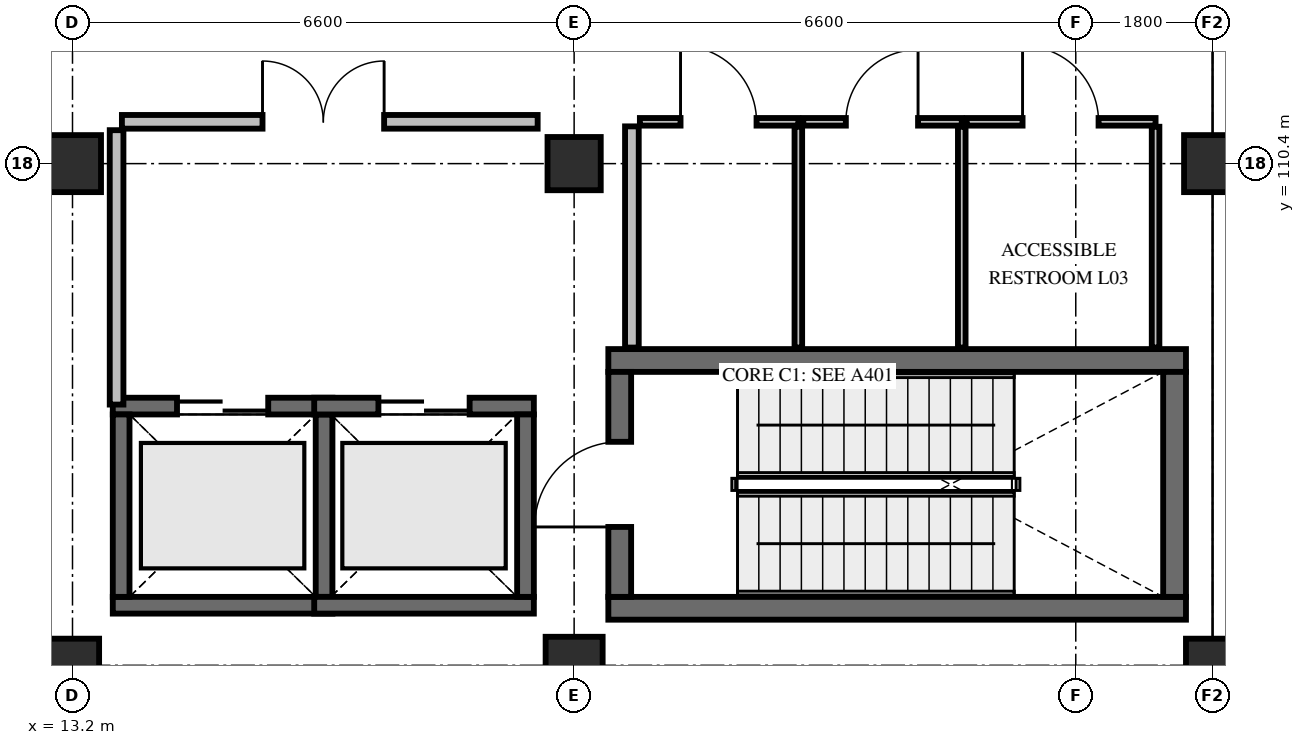
"""IFC4 building model, lengths in metres.
Left out: names, types, materials, properties, quantities, classifications, styles, units other than length and angle.
Written with IfcOpenShell. Run it as: python <this file> out.ifc"""

import sys

from ifc_helpers import new_model, si_unit, direction, frame, frame_2d, origin, origin_2d, place, context, subcontext, project, spatial, rectangle, extrude, element, fill, save


model = new_model("IFC4")
c1 = context("Model", 3, precision=1e-05, world=origin(), true_north=direction((0.0, 1.0)))
c2 = subcontext(c1, "Body", "Model", "MODEL_VIEW")
j1 = project(units=[si_unit("LENGTHUNIT", "METRE"), si_unit("PLANEANGLEUNIT", "RADIAN")], contexts=[c1])
p1 = place(None, origin())
s1 = spatial("IfcSite", under=j1, at=p1, CompositionType="ELEMENT")
p2 = place(p1, origin())
s2 = spatial("IfcBuilding", under=s1, at=p2, CompositionType="ELEMENT")
p3 = place(p2, frame((0.0, 0.0, 15.0)))
s3 = spatial("IfcBuildingStorey", under=s2, at=p3, CompositionType="ELEMENT", Elevation=15.0)
p4 = place(p3, frame((13.2, 103.8, 0.0), z_axis=(0.0, 0.0, 1.0), x_axis=(1.0, 0.0, 0.0)))
e1 = element("IfcColumn", 1, at=p4, inside=s3, PredefinedType="COLUMN", context=c2, shape_type="SweptSolid", body=[
    extrude(rectangle(XDim=0.7, YDim=0.7, at=origin_2d()), origin(), (0.0, 0.0, 1.0), 4.8),
])
for number, where, z_axis, x_axis in (
    (2, (13.2, 110.4, 0.0), (0.0, 0.0, 1.0), (1.0, 0.0, 0.0)),
    (3, (19.8, 103.8, 0.0), (0.0, 0.0, 1.0), (1.0, 0.0, 0.0)),
):
    element("IfcColumn", number, at=place(p3, frame(where, z_axis=z_axis, x_axis=x_axis)), inside=s3, PredefinedType="COLUMN", context=c2, shape_type="SweptSolid", body=[
        extrude(rectangle(XDim=0.75, YDim=0.75, at=origin_2d()), origin(), (0.0, 0.0, 1.0), 4.8),
    ])
for number, where, z_axis, x_axis in (
    (4, (19.8, 110.4, 0.0), (0.0, 0.0, 1.0), (1.0, 0.0, 0.0)),
    (5, (28.2, 103.8, 0.0), (0.0, 0.0, 1.0), (1.0, 0.0, 0.0)),
):
    element("IfcColumn", number, at=place(p3, frame(where, z_axis=z_axis, x_axis=x_axis)), inside=s3, PredefinedType="COLUMN", context=c2, shape_type="SweptSolid", body=[
        extrude(rectangle(XDim=0.7, YDim=0.7, at=origin_2d()), origin(), (0.0, 0.0, 1.0), 4.8),
    ])
p5 = place(p3, frame((28.2, 110.4, 0.0), z_axis=(0.0, 0.0, 1.0), x_axis=(1.0, 0.0, 0.0)))
e6 = element("IfcColumn", 6, at=p5, inside=s3, PredefinedType="COLUMN", context=c2, shape_type="SweptSolid", body=[
    extrude(rectangle(XDim=0.75, YDim=0.75, at=origin_2d()), origin(), (0.0, 0.0, 1.0), 4.8),
])
for number, where, z_axis, x_axis in (
    (7, (20.25, 104.55, 0.0), (0.0, 0.0, 1.0), (1.0, 0.0, 0.0)),
    (8, (20.25, 107.81, 0.0), (0.0, 0.0, 1.0), (1.0, 0.0, 0.0)),
):
    element("IfcWall", number, at=place(p3, frame(where, z_axis=z_axis, x_axis=x_axis)), inside=s3, PredefinedType="SHEAR", context=c2, shape_type="SweptSolid", body=[
        extrude(rectangle(XDim=7.6, YDim=0.3, at=frame_2d((3.8, 0.0))), origin(), (0.0, 0.0, 1.0), 4.5),
    ])
p6 = place(p3, frame((20.4, 104.7, 0.0), z_axis=(0.0, 0.0, 1.0), x_axis=(0.0, 1.0, 0.0)))
e9 = element("IfcWall", 9, at=p6, inside=s3, PredefinedType="SHEAR", context=c2, shape_type="SweptSolid", body=[
    extrude(rectangle(XDim=2.96, YDim=0.3, at=frame_2d((1.48, 0.0))), origin(), (0.0, 0.0, 1.0), 4.5),
])
p7 = place(p6, frame((0.92, 0.0, 0.0)))
e10 = element("IfcOpeningElement", 10, at=p7, cuts=e9, PredefinedType="OPENING", context=c2, shape_type="SweptSolid", body=[
    extrude(rectangle(XDim=1.12, YDim=2.2, at=frame_2d((0.56, 1.1))), frame((0.0, 0.165, 0.0), z_axis=(0.0, -1.0, 0.0), x_axis=(1.0, 0.0, 0.0)), (0.0, 0.0, 1.0), 0.33),
])
p8 = place(p3, frame((27.7, 104.7, 0.0), z_axis=(0.0, 0.0, 1.0), x_axis=(0.0, 1.0, 0.0)))
e11 = element("IfcWall", 11, at=p8, inside=s3, PredefinedType="SHEAR", context=c2, shape_type="SweptSolid", body=[
    extrude(rectangle(XDim=2.96, YDim=0.3, at=frame_2d((1.48, 0.0))), origin(), (0.0, 0.0, 1.0), 4.5),
])
p9 = place(p3, frame((13.73, 104.59, 0.0), z_axis=(0.0, 0.0, 1.0), x_axis=(1.0, 0.0, 0.0)))
e12 = element("IfcWall", 12, at=p9, inside=s3, PredefinedType="SHEAR", context=c2, shape_type="SweptSolid", body=[
    extrude(rectangle(XDim=2.89, YDim=0.22, at=frame_2d((1.445, 0.0))), origin(), (0.0, 0.0, 1.0), 4.5),
])
p10 = place(p3, frame((13.73, 107.21, 0.0), z_axis=(0.0, 0.0, 1.0), x_axis=(1.0, 0.0, 0.0)))
e13 = element("IfcWall", 13, at=p10, inside=s3, PredefinedType="SHEAR", context=c2, shape_type="SweptSolid", body=[
    extrude(rectangle(XDim=2.89, YDim=0.22, at=frame_2d((1.445, 0.0))), origin(), (0.0, 0.0, 1.0), 4.5),
])
p11 = place(p10, frame((0.845, 0.0, 0.0)))
e14 = element("IfcOpeningElement", 14, at=p11, cuts=e13, PredefinedType="OPENING", context=c2, shape_type="SweptSolid", body=[
    extrude(rectangle(XDim=1.2, YDim=2.2, at=frame_2d((0.6, 1.1))), frame((0.0, 0.125, 0.0), z_axis=(0.0, -1.0, 0.0), x_axis=(1.0, 0.0, 0.0)), (0.0, 0.0, 1.0), 0.25),
])
for number, where, z_axis, x_axis in (
    (15, (13.84, 104.7, 0.0), (0.0, 0.0, 1.0), (0.0, 1.0, 0.0)),
    (16, (16.51, 104.7, 0.0), (0.0, 0.0, 1.0), (0.0, 1.0, 0.0)),
):
    element("IfcWall", number, at=place(p3, frame(where, z_axis=z_axis, x_axis=x_axis)), inside=s3, PredefinedType="SHEAR", context=c2, shape_type="SweptSolid", body=[
        extrude(rectangle(XDim=2.4, YDim=0.22, at=frame_2d((1.2, 0.0))), origin(), (0.0, 0.0, 1.0), 4.5),
    ])
p12 = place(p3, frame((16.38, 104.59, 0.0), z_axis=(0.0, 0.0, 1.0), x_axis=(1.0, 0.0, 0.0)))
e17 = element("IfcWall", 17, at=p12, inside=s3, PredefinedType="SHEAR", context=c2, shape_type="SweptSolid", body=[
    extrude(rectangle(XDim=2.89, YDim=0.22, at=frame_2d((1.445, 0.0))), origin(), (0.0, 0.0, 1.0), 4.5),
])
p13 = place(p3, frame((16.38, 107.21, 0.0), z_axis=(0.0, 0.0, 1.0), x_axis=(1.0, 0.0, 0.0)))
e18 = element("IfcWall", 18, at=p13, inside=s3, PredefinedType="SHEAR", context=c2, shape_type="SweptSolid", body=[
    extrude(rectangle(XDim=2.89, YDim=0.22, at=frame_2d((1.445, 0.0))), origin(), (0.0, 0.0, 1.0), 4.5),
])
p14 = place(p13, frame((0.845, 0.0, 0.0)))
e19 = element("IfcOpeningElement", 19, at=p14, cuts=e18, PredefinedType="OPENING", context=c2, shape_type="SweptSolid", body=[
    extrude(rectangle(XDim=1.2, YDim=2.2, at=frame_2d((0.6, 1.1))), frame((0.0, 0.125, 0.0), z_axis=(0.0, -1.0, 0.0), x_axis=(1.0, 0.0, 0.0)), (0.0, 0.0, 1.0), 0.25),
])
p15 = place(p3, frame((19.16, 104.7, 0.0), z_axis=(0.0, 0.0, 1.0), x_axis=(0.0, 1.0, 0.0)))
e20 = element("IfcWall", 20, at=p15, inside=s3, PredefinedType="SHEAR", context=c2, shape_type="SweptSolid", body=[
    extrude(rectangle(XDim=2.4, YDim=0.22, at=frame_2d((1.2, 0.0))), origin(), (0.0, 0.0, 1.0), 4.5),
])
p16 = place(p3, frame((13.85, 110.95, 0.0), z_axis=(0.0, 0.0, 1.0), x_axis=(1.0, 0.0, 0.0)))
e21 = element("IfcWall", 21, at=p16, inside=s3, PredefinedType="PARTITIONING", context=c2, shape_type="SweptSolid", body=[
    extrude(rectangle(XDim=5.47, YDim=0.18, at=frame_2d((2.735, 0.0))), origin(), (0.0, 0.0, 1.0), 4.295),
])
p17 = place(p16, frame((1.85, 0.0, 0.0)))
e22 = element("IfcOpeningElement", 22, at=p17, cuts=e21, PredefinedType="OPENING", context=c2, shape_type="SweptSolid", body=[
    extrude(rectangle(XDim=1.6, YDim=2.25, at=frame_2d((0.8, 1.125))), frame((0.0, 0.105, 0.0), z_axis=(0.0, -1.0, 0.0), x_axis=(1.0, 0.0, 0.0)), (0.0, 0.0, 1.0), 0.21),
])
p18 = place(p3, frame((13.78, 107.23, 0.0), z_axis=(0.0, 0.0, 1.0), x_axis=(0.0, 1.0, 0.0)))
e23 = element("IfcWall", 23, at=p18, inside=s3, PredefinedType="PARTITIONING", context=c2, shape_type="SweptSolid", body=[
    extrude(rectangle(XDim=3.61, YDim=0.18, at=frame_2d((1.805, 0.0))), origin(), (0.0, 0.0, 1.0), 4.18),
])
p19 = place(p3, frame((20.56, 107.98, 0.0), z_axis=(0.0, 0.0, 1.0), x_axis=(0.0, 1.0, 0.0)))
e24 = element("IfcWall", 24, at=p19, inside=s3, PredefinedType="PARTITIONING", context=c2, shape_type="SweptSolid", body=[
    extrude(rectangle(XDim=2.91, YDim=0.18, at=frame_2d((1.455, 0.0))), origin(), (0.0, 0.0, 1.0), 3.83),
])
p20 = place(p3, frame((20.665, 110.95, 0.0), z_axis=(0.0, 0.0, 1.0), x_axis=(1.0, 0.0, 0.0)))
e25 = element("IfcWall", 25, at=p20, inside=s3, PredefinedType="PARTITIONING", context=c2, shape_type="SweptSolid", body=[
    extrude(rectangle(XDim=2.085, YDim=0.1, at=frame_2d((1.042, 0.0))), origin(), (0.0, 0.0, 1.0), 4.295),
])
p21 = place(p20, frame((0.535, 0.0, 0.0)))
e26 = element("IfcOpeningElement", 26, at=p21, cuts=e25, PredefinedType="OPENING", context=c2, shape_type="SweptSolid", body=[
    extrude(rectangle(XDim=1.0, YDim=2.15, at=frame_2d((0.5, 1.075))), frame((0.0, 0.065, 0.0), z_axis=(0.0, -1.0, 0.0), x_axis=(1.0, 0.0, 0.0)), (0.0, 0.0, 1.0), 0.13),
])
p22 = place(p3, frame((22.75, 107.98, 0.0), z_axis=(0.0, 0.0, 1.0), x_axis=(0.0, 1.0, 0.0)))
e27 = element("IfcWall", 27, at=p22, inside=s3, PredefinedType="PARTITIONING", context=c2, shape_type="SweptSolid", body=[
    extrude(rectangle(XDim=2.905, YDim=0.1, at=frame_2d((1.453, 0.0))), origin(), (0.0, 0.0, 1.0), 3.83),
])
p23 = place(p3, frame((22.815, 110.95, 0.0), z_axis=(0.0, 0.0, 1.0), x_axis=(1.0, 0.0, 0.0)))
e28 = element("IfcWall", 28, at=p23, inside=s3, PredefinedType="PARTITIONING", context=c2, shape_type="SweptSolid", body=[
    extrude(rectangle(XDim=2.085, YDim=0.1, at=frame_2d((1.042, 0.0))), origin(), (0.0, 0.0, 1.0), 4.48),
])
p24 = place(p23, frame((0.56, 0.0, 0.0)))
e29 = element("IfcOpeningElement", 29, at=p24, cuts=e28, PredefinedType="OPENING", context=c2, shape_type="SweptSolid", body=[
    extrude(rectangle(XDim=0.95, YDim=2.15, at=frame_2d((0.475, 1.075))), frame((0.0, 0.065, 0.0), z_axis=(0.0, -1.0, 0.0), x_axis=(1.0, 0.0, 0.0)), (0.0, 0.0, 1.0), 0.13),
])
p25 = place(p3, frame((24.9, 107.98, 0.0), z_axis=(0.0, 0.0, 1.0), x_axis=(0.0, 1.0, 0.0)))
e30 = element("IfcWall", 30, at=p25, inside=s3, PredefinedType="PARTITIONING", context=c2, shape_type="SweptSolid", body=[
    extrude(rectangle(XDim=2.905, YDim=0.1, at=frame_2d((1.453, 0.0))), origin(), (0.0, 0.0, 1.0), 3.83),
])
p26 = place(p3, frame((24.965, 110.95, 0.0), z_axis=(0.0, 0.0, 1.0), x_axis=(1.0, 0.0, 0.0)))
e31 = element("IfcWall", 31, at=p26, inside=s3, PredefinedType="PARTITIONING", context=c2, shape_type="SweptSolid", body=[
    extrude(rectangle(XDim=2.485, YDim=0.1, at=frame_2d((1.242, 0.0))), origin(), (0.0, 0.0, 1.0), 4.295),
])
p27 = place(p26, frame((0.735, 0.0, 0.0)))
e32 = element("IfcOpeningElement", 32, at=p27, cuts=e31, PredefinedType="OPENING", context=c2, shape_type="SweptSolid", body=[
    extrude(rectangle(XDim=1.0, YDim=2.15, at=frame_2d((0.5, 1.075))), frame((0.0, 0.065, 0.0), z_axis=(0.0, -1.0, 0.0), x_axis=(1.0, 0.0, 0.0)), (0.0, 0.0, 1.0), 0.13),
])
p28 = place(p3, frame((27.45, 107.98, 0.0), z_axis=(0.0, 0.0, 1.0), x_axis=(0.0, 1.0, 0.0)))
e33 = element("IfcWall", 33, at=p28, inside=s3, PredefinedType="PARTITIONING", context=c2, shape_type="SweptSolid", body=[
    extrude(rectangle(XDim=2.905, YDim=0.1, at=frame_2d((1.453, 0.0))), origin(), (0.0, 0.0, 1.0), 3.83),
])
p29 = place(p7, origin())
e34 = element("IfcDoor", 34, at=p29, inside=s3, OperationType="SINGLE_SWING_LEFT", PredefinedType="DOOR", context=c2, shape_type="SweptSolid", body=[
    extrude(rectangle(XDim=1.12, YDim=2.2, at=frame_2d((0.56, 1.1))), frame((0.0, 0.025, 0.0), z_axis=(0.0, -1.0, 0.0), x_axis=(1.0, 0.0, 0.0)), (0.0, 0.0, 1.0), 0.05),
])
fill(e10, e34)
p30 = place(p11, origin())
e35 = element("IfcDoor", 35, at=p30, inside=s3, OperationType="DOUBLE_DOOR_SLIDING", PredefinedType="DOOR", context=c2, shape_type="SweptSolid", body=[
    extrude(rectangle(XDim=1.2, YDim=2.2, at=frame_2d((0.6, 1.1))), frame((0.0, 0.025, 0.0), z_axis=(0.0, -1.0, 0.0), x_axis=(1.0, 0.0, 0.0)), (0.0, 0.0, 1.0), 0.05),
])
fill(e14, e35)
p31 = place(p14, origin())
e36 = element("IfcDoor", 36, at=p31, inside=s3, OperationType="DOUBLE_DOOR_SLIDING", PredefinedType="DOOR", context=c2, shape_type="SweptSolid", body=[
    extrude(rectangle(XDim=1.2, YDim=2.2, at=frame_2d((0.6, 1.1))), frame((0.0, 0.025, 0.0), z_axis=(0.0, -1.0, 0.0), x_axis=(1.0, 0.0, 0.0)), (0.0, 0.0, 1.0), 0.05),
])
fill(e19, e36)
p32 = place(p17, origin())
e37 = element("IfcDoor", 37, at=p32, inside=s3, OperationType="DOUBLE_DOOR_SINGLE_SWING", PredefinedType="DOOR", context=c2, shape_type="SweptSolid", body=[
    extrude(rectangle(XDim=1.6, YDim=2.25, at=frame_2d((0.8, 1.125))), frame((0.0, 0.025, 0.0), z_axis=(0.0, -1.0, 0.0), x_axis=(1.0, 0.0, 0.0)), (0.0, 0.0, 1.0), 0.05),
])
fill(e22, e37)
p33 = place(p21, origin())
e38 = element("IfcDoor", 38, at=p33, inside=s3, OperationType="SINGLE_SWING_LEFT", PredefinedType="DOOR", context=c2, shape_type="SweptSolid", body=[
    extrude(rectangle(XDim=1.0, YDim=2.15, at=frame_2d((0.5, 1.075))), frame((0.0, 0.025, 0.0), z_axis=(0.0, -1.0, 0.0), x_axis=(1.0, 0.0, 0.0)), (0.0, 0.0, 1.0), 0.05),
])
fill(e26, e38)
p34 = place(p24, origin())
e39 = element("IfcDoor", 39, at=p34, inside=s3, OperationType="SINGLE_SWING_RIGHT", PredefinedType="DOOR", context=c2, shape_type="SweptSolid", body=[
    extrude(rectangle(XDim=0.95, YDim=2.15, at=frame_2d((0.475, 1.075))), frame((0.0, 0.025, 0.0), z_axis=(0.0, -1.0, 0.0), x_axis=(1.0, 0.0, 0.0)), (0.0, 0.0, 1.0), 0.05),
])
fill(e29, e39)
p35 = place(p27, origin())
e40 = element("IfcDoor", 40, at=p35, inside=s3, OperationType="SINGLE_SWING_LEFT", PredefinedType="DOOR", context=c2, shape_type="SweptSolid", body=[
    extrude(rectangle(XDim=1.0, YDim=2.15, at=frame_2d((0.5, 1.075))), frame((0.0, 0.025, 0.0), z_axis=(0.0, -1.0, 0.0), x_axis=(1.0, 0.0, 0.0)), (0.0, 0.0, 1.0), 0.05),
])
fill(e32, e40)
save(model, sys.argv[1])
